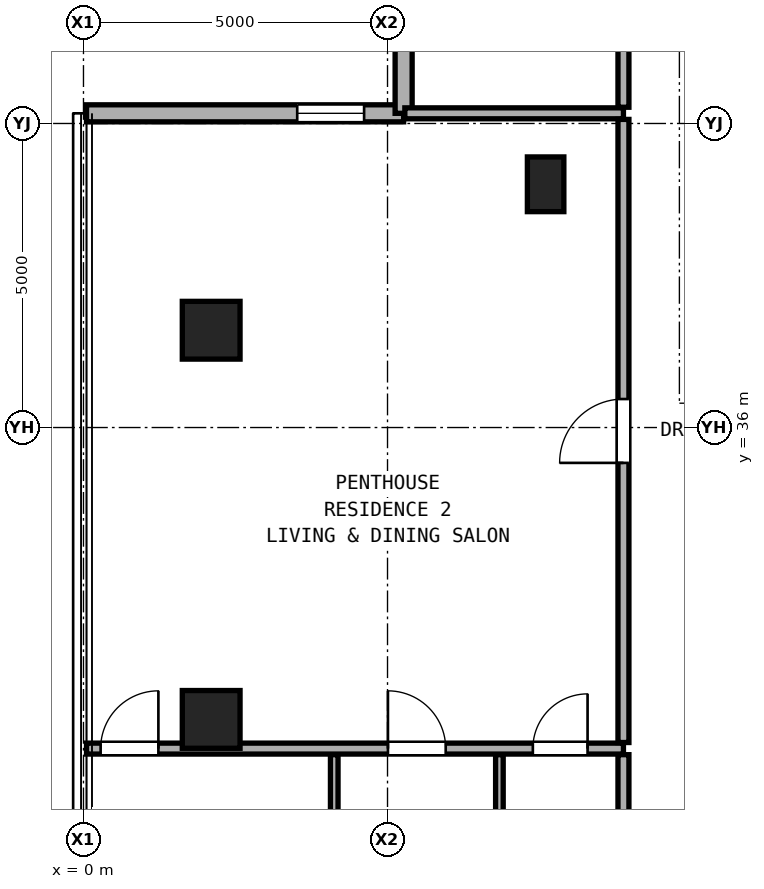
"""IFC4 building model, lengths in metres.
Left out: names, types, materials, properties, quantities, classifications, styles, units other than length and angle.
Written with IfcOpenShell. Run it as: python <this file> out.ifc"""

import sys

from ifc_helpers import new_model, si_unit, direction, frame, frame_2d, origin, origin_2d, place, context, subcontext, project, spatial, rectangle, hollow_rectangle, extrude, element, fill, save


model = new_model("IFC4")
c1 = context("Model", 3, precision=1e-05, world=origin(), true_north=direction((0.0, 1.0)))
c2 = subcontext(c1, "Body", "Model", "MODEL_VIEW")
j1 = project(units=[si_unit("LENGTHUNIT", "METRE"), si_unit("PLANEANGLEUNIT", "RADIAN")], contexts=[c1])
p1 = place(None, origin())
s1 = spatial("IfcSite", under=j1, at=p1, CompositionType="ELEMENT")
p2 = place(p1, origin())
s2 = spatial("IfcBuilding", under=s1, at=p2, CompositionType="ELEMENT")
p3 = place(p2, frame((0.0, 0.0, 196.65)))
s3 = spatial("IfcBuildingStorey", under=s2, at=p3, CompositionType="ELEMENT", Elevation=196.65)
for number, where, z_axis, x_axis in (
    (1, (2.1, 31.2, 0.0), (0.0, 0.0, 1.0), (1.0, 0.0, 0.0)),
    (2, (2.1, 37.6, 0.0), (0.0, 0.0, 1.0), (1.0, 0.0, 0.0)),
):
    element("IfcColumn", number, at=place(p3, frame(where, z_axis=z_axis, x_axis=x_axis)), inside=s3, PredefinedType="COLUMN", context=c2, shape_type="SweptSolid", body=[
        extrude(hollow_rectangle(XDim=0.95, YDim=0.95, WallThickness=0.05, at=origin_2d()), origin(), (0.0, 0.0, 1.0), 3.25),
    ])
p4 = place(p3, frame((7.6, 40.0, 0.0), z_axis=(0.0, 0.0, 1.0), x_axis=(1.0, 0.0, 0.0)))
e3 = element("IfcColumn", 3, at=p4, inside=s3, PredefinedType="PILASTER", context=c2, shape_type="SweptSolid", body=[
    extrude(rectangle(XDim=0.6, YDim=0.9, at=origin_2d()), origin(), (0.0, 0.0, 1.0), 3.25),
])
p5 = place(p3, frame((5.265, 41.167, 0.0), z_axis=(0.0, 0.0, 1.0), x_axis=(-1.0, 0.0, 0.0)))
e4 = element("IfcWall", 4, at=p5, inside=s3, PredefinedType="SOLIDWALL", context=c2, shape_type="SweptSolid", body=[
    extrude(rectangle(XDim=5.215, YDim=0.28, at=frame_2d((2.607, 0.0))), origin(), (0.0, 0.0, 1.0), 3.03),
])
p6 = place(p5, frame((0.65, 0.0, 0.85)))
e5 = element("IfcOpeningElement", 5, at=p6, cuts=e4, PredefinedType="OPENING", context=c2, shape_type="SweptSolid", body=[
    extrude(rectangle(XDim=1.1, YDim=2.0, at=frame_2d((0.55, 1.0))), frame((0.0, 0.15, 0.0), z_axis=(0.0, -1.0, 0.0), x_axis=(1.0, 0.0, 0.0)), (0.0, 0.0, 1.0), 0.3),
])
p7 = place(p3, frame((5.265, 46.382, 0.0), z_axis=(0.0, 0.0, 1.0), x_axis=(0.0, -1.0, 0.0)))
e6 = element("IfcWall", 6, at=p7, inside=s3, PredefinedType="SOLIDWALL", context=c2, shape_type="SweptSolid", body=[
    extrude(rectangle(XDim=5.215, YDim=0.28, at=frame_2d((2.607, 0.0))), origin(), (0.0, 0.0, 1.0), 3.03),
])
p8 = place(p3, frame((0.05, 30.72, 0.0), z_axis=(0.0, 0.0, 1.0), x_axis=(1.0, 0.0, 0.0)))
e7 = element("IfcWall", 7, at=p8, inside=s3, PredefinedType="PARTITIONING", context=c2, shape_type="SweptSolid", body=[
    extrude(rectangle(XDim=8.83, YDim=0.18, at=frame_2d((4.415, 0.0))), origin(), (0.0, 0.0, 1.0), 2.269),
])
p9 = place(p8, frame((0.232, 0.0, 0.0)))
e8 = element("IfcOpeningElement", 8, at=p9, cuts=e7, PredefinedType="OPENING", context=c2, shape_type="SweptSolid", body=[
    extrude(rectangle(XDim=0.95, YDim=2.15, at=frame_2d((0.475, 1.075))), frame((0.0, 0.1, 0.0), z_axis=(0.0, -1.0, 0.0), x_axis=(1.0, 0.0, 0.0)), (0.0, 0.0, 1.0), 0.2),
])
p10 = place(p8, frame((4.957, 0.0, 0.0)))
e9 = element("IfcOpeningElement", 9, at=p10, cuts=e7, PredefinedType="OPENING", context=c2, shape_type="SweptSolid", body=[
    extrude(rectangle(XDim=0.95, YDim=2.15, at=frame_2d((0.475, 1.075))), frame((0.0, 0.1, 0.0), z_axis=(0.0, -1.0, 0.0), x_axis=(1.0, 0.0, 0.0)), (0.0, 0.0, 1.0), 0.2),
])
p11 = place(p8, frame((7.34, 0.0, 0.0)))
e10 = element("IfcOpeningElement", 10, at=p11, cuts=e7, PredefinedType="OPENING", context=c2, shape_type="SweptSolid", body=[
    extrude(rectangle(XDim=0.9, YDim=2.1, at=frame_2d((0.45, 1.05))), frame((0.0, 0.1, 0.0), z_axis=(0.0, -1.0, 0.0), x_axis=(1.0, 0.0, 0.0)), (0.0, 0.0, 1.0), 0.2),
])
p12 = place(p3, frame((5.285, 41.167, 0.0), z_axis=(0.0, 0.0, 1.0), x_axis=(1.0, 0.0, 0.0)))
e11 = element("IfcWall", 11, at=p12, inside=s3, PredefinedType="PARTITIONING", context=c2, shape_type="SweptSolid", body=[
    extrude(rectangle(XDim=3.595, YDim=0.18, at=frame_2d((1.797, 0.0))), origin(), (0.0, 0.0, 1.0), 3.05),
])
for number, where, z_axis, x_axis in (
    (12, (4.124, 28.073, 0.0), (0.0, 0.0, 1.0), (0.0, 1.0, 0.0)),
    (13, (6.84, 28.073, 0.0), (0.0, 0.0, 1.0), (0.0, 1.0, 0.0)),
):
    element("IfcWall", number, at=place(p3, frame(where, z_axis=z_axis, x_axis=x_axis)), inside=s3, PredefinedType="PARTITIONING", context=c2, shape_type="SweptSolid", body=[
        extrude(rectangle(XDim=2.548, YDim=0.125, at=frame_2d((1.274, 0.0))), origin(), (0.0, 0.0, 1.0), 3.05),
    ])
p13 = place(p3, frame((8.88, 28.073, 0.0), z_axis=(0.0, 0.0, 1.0), x_axis=(0.0, 1.0, 0.0)))
e14 = element("IfcWall", 14, at=p13, inside=s3, PredefinedType="PARTITIONING", context=c2, shape_type="SweptSolid", body=[
    extrude(rectangle(XDim=2.548, YDim=0.18, at=frame_2d((1.274, 0.0))), origin(), (0.0, 0.0, 1.0), 3.05),
])
p14 = place(p3, frame((8.88, 30.82, 0.0), z_axis=(0.0, 0.0, 1.0), x_axis=(0.0, 1.0, 0.0)))
e15 = element("IfcWall", 15, at=p14, inside=s3, PredefinedType="PARTITIONING", context=c2, shape_type="SweptSolid", body=[
    extrude(rectangle(XDim=10.247, YDim=0.18, at=frame_2d((5.124, 0.0))), origin(), (0.0, 0.0, 1.0), 2.346),
])
p15 = place(p14, frame((4.598, 0.0, 0.0)))
e16 = element("IfcOpeningElement", 16, at=p15, cuts=e15, PredefinedType="OPENING", context=c2, shape_type="SweptSolid", body=[
    extrude(rectangle(XDim=1.05, YDim=2.2, at=frame_2d((0.525, 1.1))), frame((0.0, 0.1, 0.0), z_axis=(0.0, -1.0, 0.0), x_axis=(1.0, 0.0, 0.0)), (0.0, 0.0, 1.0), 0.2),
])
p16 = place(p3, frame((8.88, 41.267, 0.0), z_axis=(0.0, 0.0, 1.0), x_axis=(0.0, 1.0, 0.0)))
e17 = element("IfcWall", 17, at=p16, inside=s3, PredefinedType="PARTITIONING", context=c2, shape_type="SweptSolid", body=[
    extrude(rectangle(XDim=5.115, YDim=0.18, at=frame_2d((2.558, 0.0))), origin(), (0.0, 0.0, 1.0), 3.05),
])
p17 = place(p16, frame((2.083, 0.0, 0.0)))
e18 = element("IfcOpeningElement", 18, at=p17, cuts=e17, PredefinedType="OPENING", context=c2, shape_type="SweptSolid", body=[
    extrude(rectangle(XDim=0.95, YDim=2.15, at=frame_2d((0.475, 1.075))), frame((0.0, 0.1, 0.0), z_axis=(0.0, -1.0, 0.0), x_axis=(1.0, 0.0, 0.0)), (0.0, 0.0, 1.0), 0.2),
])
p18 = place(p6, origin())
e19 = element("IfcWindow", 19, at=p18, inside=s3, PartitioningType="SINGLE_PANEL", PredefinedType="WINDOW", context=c2, shape_type="SweptSolid", body=[
    extrude(rectangle(XDim=1.1, YDim=2.0, at=frame_2d((0.55, 1.0))), frame((0.0, 0.03, 0.0), z_axis=(0.0, -1.0, 0.0), x_axis=(1.0, 0.0, 0.0)), (0.0, 0.0, 1.0), 0.06),
])
fill(e5, e19)
p19 = place(p15, origin())
e20 = element("IfcDoor", 20, at=p19, inside=s3, OperationType="SINGLE_SWING_LEFT", PredefinedType="DOOR", context=c2, shape_type="SweptSolid", body=[
    extrude(rectangle(XDim=1.05, YDim=2.2, at=frame_2d((0.525, 1.1))), frame((0.0, 0.025, 0.0), z_axis=(0.0, -1.0, 0.0), x_axis=(1.0, 0.0, 0.0)), (0.0, 0.0, 1.0), 0.05),
])
fill(e16, e20)
p20 = place(p9, origin())
e21 = element("IfcDoor", 21, at=p20, inside=s3, OperationType="SINGLE_SWING_RIGHT", PredefinedType="DOOR", context=c2, shape_type="SweptSolid", body=[
    extrude(rectangle(XDim=0.95, YDim=2.15, at=frame_2d((0.475, 1.075))), frame((0.0, 0.025, 0.0), z_axis=(0.0, -1.0, 0.0), x_axis=(1.0, 0.0, 0.0)), (0.0, 0.0, 1.0), 0.05),
])
fill(e8, e21)
p21 = place(p10, origin())
e22 = element("IfcDoor", 22, at=p21, inside=s3, OperationType="SINGLE_SWING_LEFT", PredefinedType="DOOR", context=c2, shape_type="SweptSolid", body=[
    extrude(rectangle(XDim=0.95, YDim=2.15, at=frame_2d((0.475, 1.075))), frame((0.0, 0.025, 0.0), z_axis=(0.0, -1.0, 0.0), x_axis=(1.0, 0.0, 0.0)), (0.0, 0.0, 1.0), 0.05),
])
fill(e9, e22)
p22 = place(p11, origin())
e23 = element("IfcDoor", 23, at=p22, inside=s3, OperationType="SINGLE_SWING_RIGHT", PredefinedType="DOOR", context=c2, shape_type="SweptSolid", body=[
    extrude(rectangle(XDim=0.9, YDim=2.1, at=frame_2d((0.45, 1.05))), frame((0.0, 0.025, 0.0), z_axis=(0.0, -1.0, 0.0), x_axis=(1.0, 0.0, 0.0)), (0.0, 0.0, 1.0), 0.05),
])
fill(e10, e23)
save(model, sys.argv[1])
